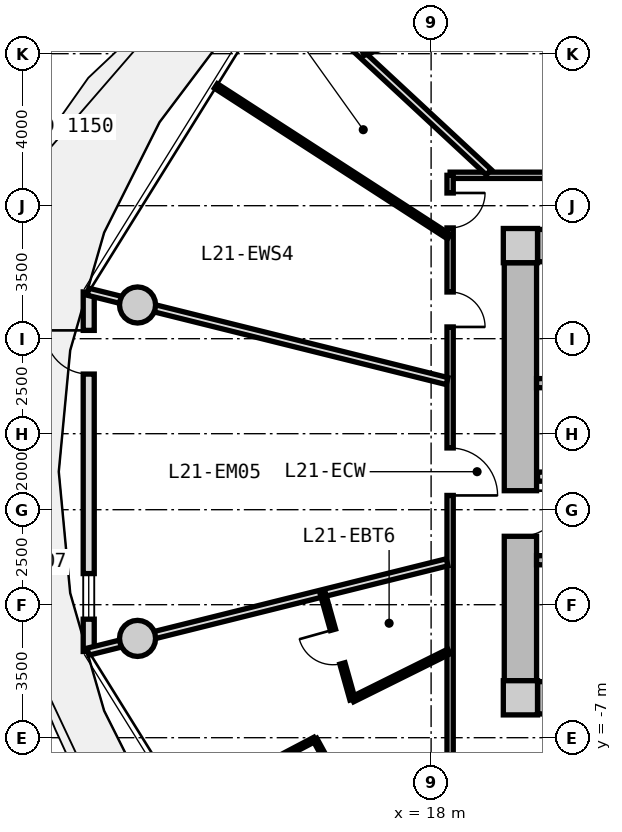
"""IFC4 building model, lengths in metres.
Left out: names, types, materials, properties, quantities, classifications, styles, units other than length and angle.
Written with IfcOpenShell. Run it as: python <this file> out.ifc"""

import sys

from ifc_helpers import new_model, si_unit, direction, frame, frame_2d, origin, origin_2d, place, context, subcontext, project, spatial, rectangle, circle, extrude, source, transform, mapped, element, fill, save


model = new_model("IFC4")
c1 = context("Model", 3, precision=1e-05, world=origin(), true_north=direction((0.0, 1.0)))
c2 = subcontext(c1, "Body", "Model", "MODEL_VIEW")
j1 = project(units=[si_unit("LENGTHUNIT", "METRE"), si_unit("PLANEANGLEUNIT", "RADIAN")], contexts=[c1])
p1 = place(None, origin())
s1 = spatial("IfcSite", under=j1, at=p1, CompositionType="ELEMENT")
p2 = place(p1, origin())
s2 = spatial("IfcBuilding", under=s1, at=p2, CompositionType="ELEMENT")
p3 = place(p2, frame((0.0, 0.0, 70.4)))
s3 = spatial("IfcBuildingStorey", under=s2, at=p3, CompositionType="ELEMENT", Elevation=70.4)
m1 = source(origin(), c2, "Body", "SweptSolid", [
    extrude(rectangle(XDim=0.9, YDim=0.9, at=origin_2d()), origin(), (0.0, 0.0, 1.0), 3.05),
])
for number, where, z_axis, x_axis in (
    (1, (20.35, -5.95, 0.0), (0.0, 0.0, 1.0), (1.0, 0.0, 0.0)),
    (2, (20.35, 5.95, 0.0), (0.0, 0.0, 1.0), (1.0, 0.0, 0.0)),
):
    element("IfcColumn", number, at=place(p3, frame(where, z_axis=z_axis, x_axis=x_axis)), inside=s3, PredefinedType="COLUMN", context=c2, shape_type="MappedRepresentation", body=[
        mapped(m1, transform((0.0, 0.0, 0.0), x_axis=(1.0, 0.0, 0.0), y_axis=(0.0, 1.0, 0.0), z_axis=(0.0, 0.0, 1.0), scale=1.0)),
    ])
m2 = source(origin(), c2, "Body", "SweptSolid", [
    extrude(rectangle(XDim=14.4, YDim=0.85, at=frame_2d((7.2, 0.0))), origin(), (0.0, 0.0, 1.0), 2.73),
])
for number, where, z_axis, x_axis in (
    (3, (20.8, 5.95, 0.0), (0.0, 0.0, 1.0), (1.0, 0.0, 0.0)),
    (4, (35.2, -5.95, 0.0), (0.0, 0.0, 1.0), (-1.0, 0.0, 0.0)),
):
    element("IfcWall", number, at=place(p3, frame(where, z_axis=z_axis, x_axis=x_axis)), inside=s3, PredefinedType="SHEAR", context=c2, shape_type="MappedRepresentation", body=[
        mapped(m2, transform((0.0, 0.0, 0.0), x_axis=(1.0, 0.0, 0.0), y_axis=(0.0, 1.0, 0.0), z_axis=(0.0, 0.0, 1.0), scale=1.0)),
    ])
m3 = source(origin(), c2, "Body", "SweptSolid", [
    extrude(rectangle(XDim=11.0, YDim=0.85, at=frame_2d((5.5, 0.0))), origin(), (0.0, 0.0, 1.0), 2.73),
])
p4 = place(p3, frame((20.35, -5.5, 0.0), z_axis=(0.0, 0.0, 1.0), x_axis=(0.0, 1.0, 0.0)))
e5 = element("IfcWall", 5, at=p4, inside=s3, PredefinedType="SHEAR", context=c2, shape_type="MappedRepresentation", body=[
    mapped(m3, transform((0.0, 0.0, 0.0), x_axis=(1.0, 0.0, 0.0), y_axis=(0.0, 1.0, 0.0), z_axis=(0.0, 0.0, 1.0), scale=1.0)),
])
p5 = place(p4, frame((3.8, 0.0, 0.0)))
e6 = element("IfcOpeningElement", 6, at=p5, cuts=e5, PredefinedType="OPENING", context=c2, shape_type="SweptSolid", body=[
    extrude(rectangle(XDim=1.2, YDim=2.15, at=frame_2d((0.6, 1.075))), frame((0.0, 0.435, 0.0), z_axis=(0.0, -1.0, 0.0), x_axis=(1.0, 0.0, 0.0)), (0.0, 0.0, 1.0), 0.87),
])
m4 = source(origin(), c2, "Body", "SweptSolid", [
    extrude(circle(Radius=0.475, at=origin_2d()), origin(), (0.0, 0.0, 1.0), 3.05),
])
for number, where, z_axis, x_axis in (
    (7, (10.275, 4.387, 0.0), (0.0, 0.0, 1.0), (1.0, 0.0, 0.0)),
    (8, (10.275, -4.387, 0.0), (0.0, 0.0, 1.0), (1.0, 0.0, 0.0)),
):
    element("IfcColumn", number, at=place(p3, frame(where, z_axis=z_axis, x_axis=x_axis)), inside=s3, PredefinedType="COLUMN", context=c2, shape_type="MappedRepresentation", body=[
        mapped(m4, transform((0.0, 0.0, 0.0), x_axis=(1.0, 0.0, 0.0), y_axis=(0.0, 1.0, 0.0), z_axis=(0.0, 0.0, 1.0), scale=1.0)),
    ])
m5 = source(origin(), c2, "Body", "SweptSolid", [
    extrude(rectangle(XDim=9.462, YDim=0.29, at=frame_2d((4.731, 0.0))), origin(), (0.0, 0.0, 1.0), 2.73),
])
p6 = place(p3, frame((8.99, -4.731, 0.0), z_axis=(0.0, 0.0, 1.0), x_axis=(0.0, 1.0, 0.0)))
e9 = element("IfcWall", 9, at=p6, inside=s3, PredefinedType="SOLIDWALL", context=c2, shape_type="MappedRepresentation", body=[
    mapped(m5, transform((0.0, 0.0, 0.0), x_axis=(1.0, 0.0, 0.0), y_axis=(0.0, 1.0, 0.0), z_axis=(0.0, 0.0, 1.0), scale=1.0)),
])
p7 = place(p6, frame((7.3, 0.0, 0.0)))
e10 = element("IfcOpeningElement", 10, at=p7, cuts=e9, PredefinedType="OPENING", context=c2, shape_type="SweptSolid", body=[
    extrude(rectangle(XDim=1.15, YDim=2.25, at=frame_2d((0.575, 1.125))), frame((0.0, 0.155, 0.0), z_axis=(0.0, -1.0, 0.0), x_axis=(1.0, 0.0, 0.0)), (0.0, 0.0, 1.0), 0.31),
])
p8 = place(p6, frame((0.85, 0.0, 0.85)))
e11 = element("IfcOpeningElement", 11, at=p8, cuts=e9, PredefinedType="OPENING", context=c2, shape_type="SweptSolid", body=[
    extrude(rectangle(XDim=1.2, YDim=1.5, at=frame_2d((0.6, 0.75))), frame((0.0, 0.155, 0.0), z_axis=(0.0, -1.0, 0.0), x_axis=(1.0, 0.0, 0.0)), (0.0, 0.0, 1.0), 0.31),
])
m6 = source(origin(), c2, "Body", "SweptSolid", [
    extrude(rectangle(XDim=7.765, YDim=0.24, at=frame_2d((3.883, 0.0))), origin(), (0.0, 0.0, 1.0), 2.73),
])
p9 = place(p3, frame((20.775, 2.33, 0.0), z_axis=(0.0, 0.0, 1.0), x_axis=(1.0, 0.0, 0.0)))
e12 = element("IfcWall", 12, at=p9, inside=s3, PredefinedType="PARTITIONING", context=c2, shape_type="MappedRepresentation", body=[
    mapped(m6, transform((0.0, 0.0, 0.0), x_axis=(1.0, 0.0, 0.0), y_axis=(0.0, 1.0, 0.0), z_axis=(0.0, 0.0, 1.0), scale=1.0)),
])
p10 = place(p3, frame((20.775, -2.33, 0.0), z_axis=(0.0, 0.0, 1.0), x_axis=(1.0, 0.0, 0.0)))
e13 = element("IfcWall", 13, at=p10, inside=s3, PredefinedType="PARTITIONING", context=c2, shape_type="MappedRepresentation", body=[
    mapped(m6, transform((0.0, 0.0, 0.0), x_axis=(1.0, 0.0, 0.0), y_axis=(0.0, 1.0, 0.0), z_axis=(0.0, 0.0, 1.0), scale=1.0)),
])
p11 = place(p10, frame((0.885, 0.0, 0.0)))
e14 = element("IfcOpeningElement", 14, at=p11, cuts=e13, PredefinedType="OPENING", context=c2, shape_type="SweptSolid", body=[
    extrude(rectangle(XDim=1.1, YDim=2.15, at=frame_2d((0.55, 1.075))), frame((0.0, 0.13, 0.0), z_axis=(0.0, -1.0, 0.0), x_axis=(1.0, 0.0, 0.0)), (0.0, 0.0, 1.0), 0.26),
])
m7 = source(origin(), c2, "Body", "SweptSolid", [
    extrude(rectangle(XDim=7.62, YDim=0.24, at=frame_2d((3.81, 0.0))), origin(), (0.0, 0.0, 1.0), 2.715),
])
p12 = place(p3, frame((20.8, -0.13, 0.0), z_axis=(0.0, 0.0, 1.0), x_axis=(1.0, 0.0, 0.0)))
e15 = element("IfcWall", 15, at=p12, inside=s3, PredefinedType="PARTITIONING", context=c2, shape_type="MappedRepresentation", body=[
    mapped(m7, transform((0.0, 0.0, 0.0), x_axis=(1.0, 0.0, 0.0), y_axis=(0.0, 1.0, 0.0), z_axis=(0.0, 0.0, 1.0), scale=1.0)),
])
p13 = place(p12, frame((6.22, 0.0, 0.0)))
e16 = element("IfcOpeningElement", 16, at=p13, cuts=e15, PredefinedType="OPENING", context=c2, shape_type="SweptSolid", body=[
    extrude(rectangle(XDim=1.0, YDim=2.1, at=frame_2d((0.5, 1.05))), frame((0.0, 0.13, 0.0), z_axis=(0.0, -1.0, 0.0), x_axis=(1.0, 0.0, 0.0)), (0.0, 0.0, 1.0), 0.26),
])
p14 = place(p12, frame((0.85, 0.0, 0.0)))
e17 = element("IfcOpeningElement", 17, at=p14, cuts=e15, PredefinedType="OPENING", context=c2, shape_type="SweptSolid", body=[
    extrude(rectangle(XDim=1.1, YDim=2.2, at=frame_2d((0.55, 1.1))), frame((0.0, 0.13, 0.0), z_axis=(0.0, -1.0, 0.0), x_axis=(1.0, 0.0, 0.0)), (0.0, 0.0, 1.0), 0.26),
])
p15 = place(p12, frame((3.85, 0.0, 0.0)))
e18 = element("IfcOpeningElement", 18, at=p15, cuts=e15, PredefinedType="OPENING", context=c2, shape_type="SweptSolid", body=[
    extrude(rectangle(XDim=1.1, YDim=2.2, at=frame_2d((0.55, 1.1))), frame((0.0, 0.13, 0.0), z_axis=(0.0, -1.0, 0.0), x_axis=(1.0, 0.0, 0.0)), (0.0, 0.0, 1.0), 0.26),
])
m8 = source(origin(), c2, "Body", "SweptSolid", [
    extrude(rectangle(XDim=19.0, YDim=0.165, at=frame_2d((9.5, 0.0))), origin(), (0.0, 0.0, 1.0), 2.715),
])
p16 = place(p3, frame((18.5, 7.8, 0.0), z_axis=(0.0, 0.0, 1.0), x_axis=(1.0, 0.0, 0.0)))
e19 = element("IfcWall", 19, at=p16, inside=s3, PredefinedType="PARTITIONING", context=c2, shape_type="MappedRepresentation", body=[
    mapped(m8, transform((0.0, 0.0, 0.0), x_axis=(1.0, 0.0, 0.0), y_axis=(0.0, 1.0, 0.0), z_axis=(0.0, 0.0, 1.0), scale=1.0)),
])
p17 = place(p16, frame((9.35, 0.0, 0.0)))
e20 = element("IfcOpeningElement", 20, at=p17, cuts=e19, PredefinedType="OPENING", context=c2, shape_type="SweptSolid", body=[
    extrude(rectangle(XDim=1.05, YDim=2.15, at=frame_2d((0.525, 1.075))), frame((0.0, 0.093, 0.0), z_axis=(0.0, -1.0, 0.0), x_axis=(1.0, 0.0, 0.0)), (0.0, 0.0, 1.0), 0.185),
])
m9 = source(origin(), c2, "Body", "SweptSolid", [
    extrude(rectangle(XDim=15.6, YDim=0.165, at=frame_2d((7.8, 0.0))), origin(), (0.0, 0.0, 1.0), 2.715),
])
p18 = place(p3, frame((18.5, -7.8, 0.0), z_axis=(0.0, 0.0, 1.0), x_axis=(0.0, 1.0, 0.0)))
e21 = element("IfcWall", 21, at=p18, inside=s3, PredefinedType="PARTITIONING", context=c2, shape_type="MappedRepresentation", body=[
    mapped(m9, transform((0.0, 0.0, 0.0), x_axis=(1.0, 0.0, 0.0), y_axis=(0.0, 1.0, 0.0), z_axis=(0.0, 0.0, 1.0), scale=1.0)),
])
p19 = place(p18, frame((14.215, 0.0, 0.0)))
e22 = element("IfcOpeningElement", 22, at=p19, cuts=e21, PredefinedType="OPENING", context=c2, shape_type="SweptSolid", body=[
    extrude(rectangle(XDim=0.92, YDim=2.1, at=frame_2d((0.46, 1.05))), frame((0.0, 0.093, 0.0), z_axis=(0.0, -1.0, 0.0), x_axis=(1.0, 0.0, 0.0)), (0.0, 0.0, 1.0), 0.185),
])
p20 = place(p18, frame((11.609, 0.0, 0.0)))
e23 = element("IfcOpeningElement", 23, at=p20, cuts=e21, PredefinedType="OPENING", context=c2, shape_type="SweptSolid", body=[
    extrude(rectangle(XDim=0.92, YDim=2.1, at=frame_2d((0.46, 1.05))), frame((0.0, 0.093, 0.0), z_axis=(0.0, -1.0, 0.0), x_axis=(1.0, 0.0, 0.0)), (0.0, 0.0, 1.0), 0.185),
])
p21 = place(p18, frame((7.175, 0.0, 0.0)))
e24 = element("IfcOpeningElement", 24, at=p21, cuts=e21, PredefinedType="OPENING", context=c2, shape_type="SweptSolid", body=[
    extrude(rectangle(XDim=1.25, YDim=2.2, at=frame_2d((0.625, 1.1))), frame((0.0, 0.093, 0.0), z_axis=(0.0, -1.0, 0.0), x_axis=(1.0, 0.0, 0.0)), (0.0, 0.0, 1.0), 0.185),
])
m10 = source(origin(), c2, "Body", "SweptSolid", [
    extrude(rectangle(XDim=9.737, YDim=0.19, at=frame_2d((4.869, 0.0))), origin(), (0.0, 0.0, 1.0), 2.165),
])
p22 = place(p3, frame((18.42, -2.385, 0.0), z_axis=(0.0, 0.0, 1.0), x_axis=(-0.970392716238, -0.241532557375, 0.0)))
e25 = element("IfcWall", 25, at=p22, inside=s3, PredefinedType="PARTITIONING", context=c2, shape_type="MappedRepresentation", body=[
    mapped(m10, transform((0.0, 0.0, 0.0), x_axis=(1.0, 0.0, 0.0), y_axis=(0.0, 1.0, 0.0), z_axis=(0.0, 0.0, 1.0), scale=1.0)),
])
m11 = source(origin(), c2, "Body", "SweptSolid", [
    extrude(rectangle(XDim=2.834, YDim=0.14, at=frame_2d((1.417, 0.0))), origin(), (0.0, 0.0, 1.0), 2.715),
])
p23 = place(p3, frame((18.47, -4.732, 0.0), z_axis=(0.0, 0.0, 1.0), x_axis=(-0.895681174462, -0.444696788513, 0.0)))
e26 = element("IfcWall", 26, at=p23, inside=s3, PredefinedType="PARTITIONING", context=c2, shape_type="MappedRepresentation", body=[
    mapped(m11, transform((0.0, 0.0, 0.0), x_axis=(1.0, 0.0, 0.0), y_axis=(0.0, 1.0, 0.0), z_axis=(0.0, 0.0, 1.0), scale=1.0)),
])
m12 = source(origin(), c2, "Body", "SweptSolid", [
    extrude(rectangle(XDim=2.885, YDim=0.14, at=frame_2d((1.442, 0.0))), origin(), (0.0, 0.0, 1.0), 2.715),
])
p24 = place(p3, frame((15.931, -5.992, 0.0), z_axis=(0.0, 0.0, 1.0), x_axis=(-0.269799431837, 0.962916541856, 0.0)))
e27 = element("IfcWall", 27, at=p24, inside=s3, PredefinedType="PARTITIONING", context=c2, shape_type="MappedRepresentation", body=[
    mapped(m12, transform((0.0, 0.0, 0.0), x_axis=(1.0, 0.0, 0.0), y_axis=(0.0, 1.0, 0.0), z_axis=(0.0, 0.0, 1.0), scale=1.0)),
])
p25 = place(p24, frame((0.982, 0.0, 0.0)))
e28 = element("IfcOpeningElement", 28, at=p25, cuts=e27, PredefinedType="OPENING", context=c2, shape_type="SweptSolid", body=[
    extrude(rectangle(XDim=0.92, YDim=2.1, at=frame_2d((0.46, 1.05))), frame((0.0, 0.08, 0.0), z_axis=(0.0, -1.0, 0.0), x_axis=(1.0, 0.0, 0.0)), (0.0, 0.0, 1.0), 0.16),
])
m13 = source(origin(), c2, "Body", "SweptSolid", [
    extrude(rectangle(XDim=3.864, YDim=0.115, at=frame_2d((1.932, 0.0))), origin(), (0.0, 0.0, 1.0), 2.715),
])
p26 = place(p3, frame((14.94, -7.041, 0.0), z_axis=(0.0, 0.0, 1.0), x_axis=(-0.885194959803, -0.465220252289, 0.0)))
e29 = element("IfcWall", 29, at=p26, inside=s3, PredefinedType="PARTITIONING", context=c2, shape_type="MappedRepresentation", body=[
    mapped(m13, transform((0.0, 0.0, 0.0), x_axis=(1.0, 0.0, 0.0), y_axis=(0.0, 1.0, 0.0), z_axis=(0.0, 0.0, 1.0), scale=1.0)),
])
m14 = source(origin(), c2, "Body", "SweptSolid", [
    extrude(rectangle(XDim=3.888, YDim=0.115, at=frame_2d((1.944, 0.0))), origin(), (0.0, 0.0, 1.0), 2.715),
])
p27 = place(p3, frame((14.94, -7.041, 0.0), z_axis=(0.0, 0.0, 1.0), x_axis=(0.480382482853, -0.877059103007, 0.0)))
e30 = element("IfcWall", 30, at=p27, inside=s3, PredefinedType="PARTITIONING", context=c2, shape_type="MappedRepresentation", body=[
    mapped(m14, transform((0.0, 0.0, 0.0), x_axis=(1.0, 0.0, 0.0), y_axis=(0.0, 1.0, 0.0), z_axis=(0.0, 0.0, 1.0), scale=1.0)),
])
p28 = place(p27, frame((1.469, 0.0, 0.0)))
e31 = element("IfcOpeningElement", 31, at=p28, cuts=e30, PredefinedType="OPENING", context=c2, shape_type="SweptSolid", body=[
    extrude(rectangle(XDim=0.95, YDim=2.1, at=frame_2d((0.475, 1.05))), frame((0.0, 0.067, 0.0), z_axis=(0.0, -1.0, 0.0), x_axis=(1.0, 0.0, 0.0)), (0.0, 0.0, 1.0), 0.135),
])
m15 = source(origin(), c2, "Body", "SweptSolid", [
    extrude(rectangle(XDim=7.435, YDim=0.19, at=frame_2d((3.717, 0.0))), origin(), (0.0, 0.0, 1.0), 2.165),
])
p29 = place(p3, frame((19.517, 7.88, 0.0), z_axis=(0.0, 0.0, 1.0), x_axis=(-0.732651956848, 0.680603489652, 0.0)))
e32 = element("IfcWall", 32, at=p29, inside=s3, PredefinedType="PARTITIONING", context=c2, shape_type="MappedRepresentation", body=[
    mapped(m15, transform((0.0, 0.0, 0.0), x_axis=(1.0, 0.0, 0.0), y_axis=(0.0, 1.0, 0.0), z_axis=(0.0, 0.0, 1.0), scale=1.0)),
])
m16 = source(origin(), c2, "Body", "SweptSolid", [
    extrude(rectangle(XDim=8.32, YDim=0.115, at=frame_2d((4.16, 0.0))), origin(), (0.0, 0.0, 1.0), 2.715),
])
p30 = place(p3, frame((24.003, 13.93, 0.0), z_axis=(0.0, 0.0, 1.0), x_axis=(-0.936180763098, -0.351518959382, 0.0)))
e33 = element("IfcWall", 33, at=p30, inside=s3, PredefinedType="PARTITIONING", context=c2, shape_type="MappedRepresentation", body=[
    mapped(m16, transform((0.0, 0.0, 0.0), x_axis=(1.0, 0.0, 0.0), y_axis=(0.0, 1.0, 0.0), z_axis=(0.0, 0.0, 1.0), scale=1.0)),
])
p31 = place(p30, frame((3.685, 0.0, 0.0)))
e34 = element("IfcOpeningElement", 34, at=p31, cuts=e33, PredefinedType="OPENING", context=c2, shape_type="SweptSolid", body=[
    extrude(rectangle(XDim=0.95, YDim=2.1, at=frame_2d((0.475, 1.05))), frame((0.0, 0.067, 0.0), z_axis=(0.0, -1.0, 0.0), x_axis=(1.0, 0.0, 0.0)), (0.0, 0.0, 1.0), 0.135),
])
p32 = place(p3, frame((18.42, 2.385, 0.0), z_axis=(0.0, 0.0, 1.0), x_axis=(-0.970392716238, 0.241532557375, 0.0)))
e35 = element("IfcWall", 35, at=p32, inside=s3, PredefinedType="PARTITIONING", context=c2, shape_type="MappedRepresentation", body=[
    mapped(m10, transform((0.0, 0.0, 0.0), x_axis=(1.0, 0.0, 0.0), y_axis=(0.0, 1.0, 0.0), z_axis=(0.0, 0.0, 1.0), scale=1.0)),
])
m17 = source(origin(), c2, "Body", "SweptSolid", [
    extrude(rectangle(XDim=7.304, YDim=0.14, at=frame_2d((3.652, 0.0))), origin(), (0.0, 0.0, 1.0), 2.715),
])
p33 = place(p3, frame((18.47, 6.185, 0.0), z_axis=(0.0, 0.0, 1.0), x_axis=(-0.83973870965, 0.54299069929, 0.0)))
e36 = element("IfcWall", 36, at=p33, inside=s3, PredefinedType="PARTITIONING", context=c2, shape_type="MappedRepresentation", body=[
    mapped(m17, transform((0.0, 0.0, 0.0), x_axis=(1.0, 0.0, 0.0), y_axis=(0.0, 1.0, 0.0), z_axis=(0.0, 0.0, 1.0), scale=1.0)),
])
m18 = source(origin(), c2, "Body", "SweptSolid", [
    extrude(rectangle(XDim=1.15, YDim=2.25, at=frame_2d((0.575, 1.125))), frame((0.0, 0.025, 0.0), z_axis=(0.0, -1.0, 0.0), x_axis=(1.0, 0.0, 0.0)), (0.0, 0.0, 1.0), 0.05),
])
p34 = place(p7, origin())
e37 = element("IfcDoor", 37, at=p34, inside=s3, OperationType="SINGLE_SWING_RIGHT", PredefinedType="DOOR", context=c2, shape_type="MappedRepresentation", body=[
    mapped(m18, transform((0.0, 0.0, 0.0), x_axis=(1.0, 0.0, 0.0), y_axis=(0.0, 1.0, 0.0), z_axis=(0.0, 0.0, 1.0), scale=1.0)),
])
fill(e10, e37)
m19 = source(origin(), c2, "Body", "SweptSolid", [
    extrude(rectangle(XDim=1.2, YDim=1.5, at=frame_2d((0.6, 0.75))), frame((0.0, 0.03, 0.0), z_axis=(0.0, -1.0, 0.0), x_axis=(1.0, 0.0, 0.0)), (0.0, 0.0, 1.0), 0.06),
])
p35 = place(p8, origin())
e38 = element("IfcWindow", 38, at=p35, inside=s3, PartitioningType="SINGLE_PANEL", PredefinedType="WINDOW", context=c2, shape_type="MappedRepresentation", body=[
    mapped(m19, transform((0.0, 0.0, 0.0), x_axis=(1.0, 0.0, 0.0), y_axis=(0.0, 1.0, 0.0), z_axis=(0.0, 0.0, 1.0), scale=1.0)),
])
fill(e11, e38)
m20 = source(origin(), c2, "Body", "SweptSolid", [
    extrude(rectangle(XDim=1.2, YDim=2.15, at=frame_2d((0.6, 1.075))), frame((0.0, 0.025, 0.0), z_axis=(0.0, -1.0, 0.0), x_axis=(1.0, 0.0, 0.0)), (0.0, 0.0, 1.0), 0.05),
])
p36 = place(p5, frame((1.2, 0.0, 0.0), z_axis=(0.0, 0.0, 1.0), x_axis=(-1.0, 0.0, 0.0)))
e39 = element("IfcDoor", 39, at=p36, inside=s3, OperationType="SINGLE_SWING_LEFT", PredefinedType="DOOR", context=c2, shape_type="MappedRepresentation", body=[
    mapped(m20, transform((0.0, 0.0, 0.0), x_axis=(1.0, 0.0, 0.0), y_axis=(0.0, 1.0, 0.0), z_axis=(0.0, 0.0, 1.0), scale=1.0)),
])
fill(e6, e39)
m21 = source(origin(), c2, "Body", "SweptSolid", [
    extrude(rectangle(XDim=0.92, YDim=2.1, at=frame_2d((0.46, 1.05))), frame((0.0, 0.025, 0.0), z_axis=(0.0, -1.0, 0.0), x_axis=(1.0, 0.0, 0.0)), (0.0, 0.0, 1.0), 0.05),
])
p37 = place(p25, origin())
e40 = element("IfcDoor", 40, at=p37, inside=s3, OperationType="SINGLE_SWING_RIGHT", PredefinedType="DOOR", context=c2, shape_type="MappedRepresentation", body=[
    mapped(m21, transform((0.0, 0.0, 0.0), x_axis=(1.0, 0.0, 0.0), y_axis=(0.0, 1.0, 0.0), z_axis=(0.0, 0.0, 1.0), scale=1.0)),
])
fill(e28, e40)
p38 = place(p19, frame((0.92, 0.0, 0.0), z_axis=(0.0, 0.0, 1.0), x_axis=(-1.0, 0.0, 0.0)))
e41 = element("IfcDoor", 41, at=p38, inside=s3, OperationType="SINGLE_SWING_LEFT", PredefinedType="DOOR", context=c2, shape_type="MappedRepresentation", body=[
    mapped(m21, transform((0.0, 0.0, 0.0), x_axis=(1.0, 0.0, 0.0), y_axis=(0.0, 1.0, 0.0), z_axis=(0.0, 0.0, 1.0), scale=1.0)),
])
fill(e22, e41)
p39 = place(p20, frame((0.92, 0.0, 0.0), z_axis=(0.0, 0.0, 1.0), x_axis=(-1.0, 0.0, 0.0)))
e42 = element("IfcDoor", 42, at=p39, inside=s3, OperationType="SINGLE_SWING_RIGHT", PredefinedType="DOOR", context=c2, shape_type="MappedRepresentation", body=[
    mapped(m21, transform((0.0, 0.0, 0.0), x_axis=(1.0, 0.0, 0.0), y_axis=(0.0, 1.0, 0.0), z_axis=(0.0, 0.0, 1.0), scale=1.0)),
])
fill(e23, e42)
m22 = source(origin(), c2, "Body", "SweptSolid", [
    extrude(rectangle(XDim=1.25, YDim=2.2, at=frame_2d((0.625, 1.1))), frame((0.0, 0.025, 0.0), z_axis=(0.0, -1.0, 0.0), x_axis=(1.0, 0.0, 0.0)), (0.0, 0.0, 1.0), 0.05),
])
p40 = place(p21, frame((1.25, 0.0, 0.0), z_axis=(0.0, 0.0, 1.0), x_axis=(-1.0, 0.0, 0.0)))
e43 = element("IfcDoor", 43, at=p40, inside=s3, OperationType="SINGLE_SWING_RIGHT", PredefinedType="DOOR", context=c2, shape_type="MappedRepresentation", body=[
    mapped(m22, transform((0.0, 0.0, 0.0), x_axis=(1.0, 0.0, 0.0), y_axis=(0.0, 1.0, 0.0), z_axis=(0.0, 0.0, 1.0), scale=1.0)),
])
fill(e24, e43)
save(model, sys.argv[1])
